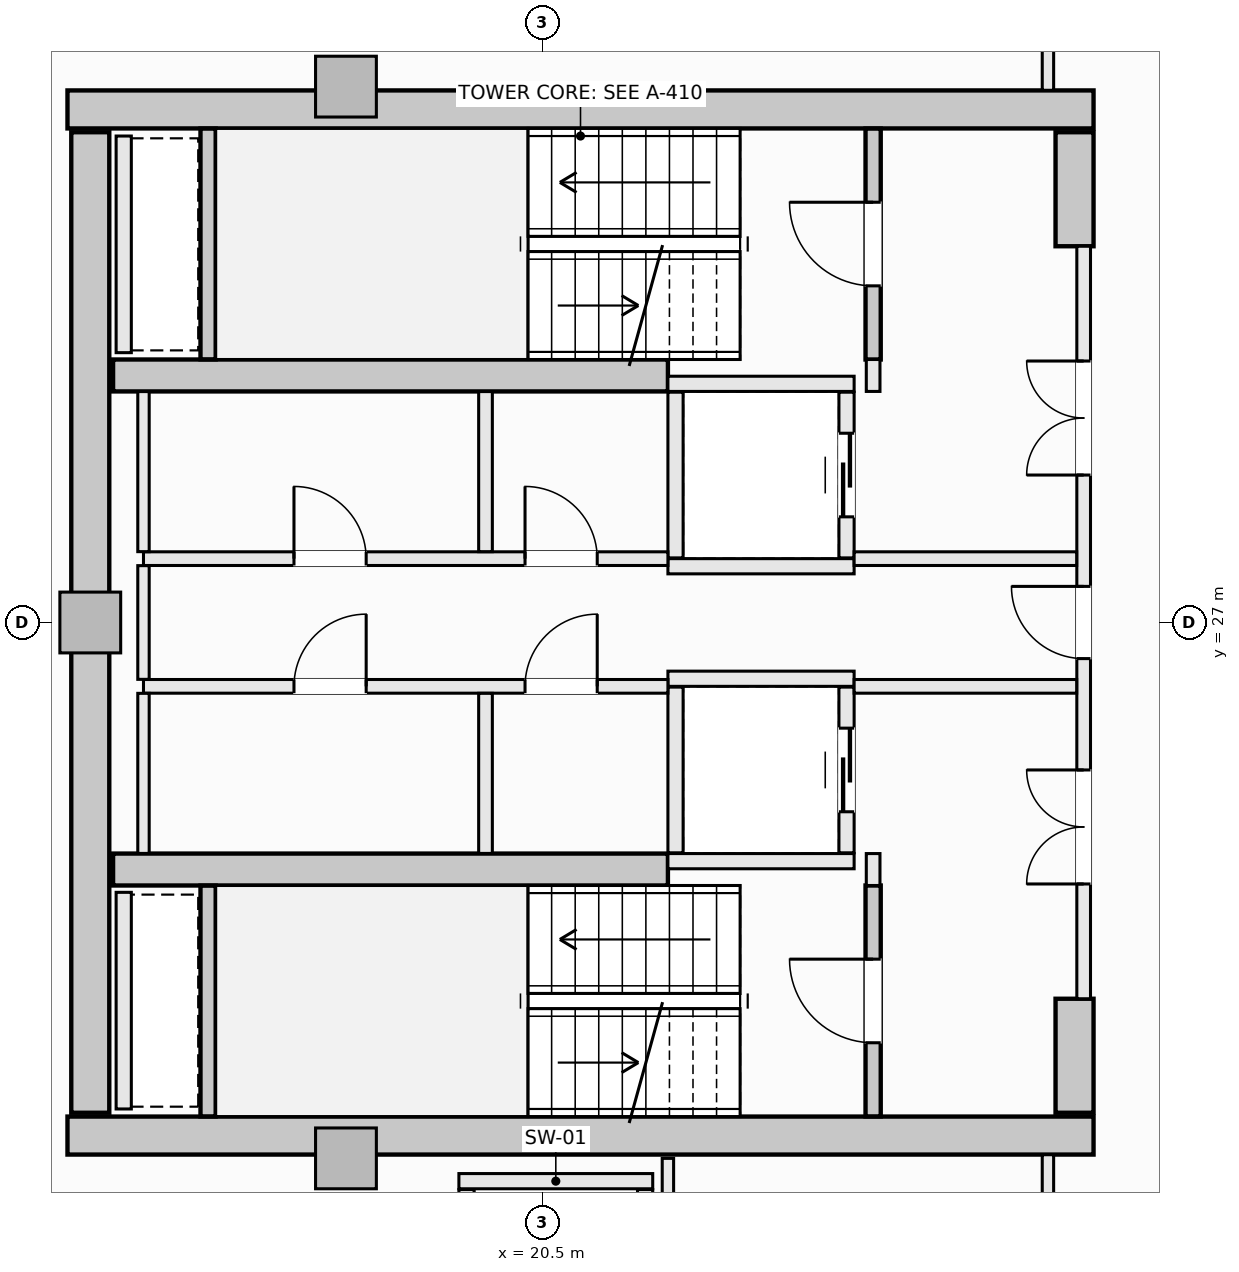
"""IFC4 building model, lengths in metres.
Left out: names, types, materials, properties, quantities, classifications, styles, units other than length and angle.
Written with IfcOpenShell. Run it as: python <this file> out.ifc"""

import sys

from ifc_helpers import new_model, si_unit, direction, frame, frame_2d, origin, origin_2d, place, context, subcontext, project, spatial, rectangle, extrude, element, fill, save


model = new_model("IFC4")
c1 = context("Model", 3, precision=1e-05, world=origin(), true_north=direction((0.0, 1.0)))
c2 = subcontext(c1, "Body", "Model", "MODEL_VIEW")
j1 = project(units=[si_unit("LENGTHUNIT", "METRE"), si_unit("PLANEANGLEUNIT", "RADIAN")], contexts=[c1])
p1 = place(None, origin())
s1 = spatial("IfcSite", under=j1, at=p1, CompositionType="ELEMENT")
p2 = place(p1, origin())
s2 = spatial("IfcBuilding", under=s1, at=p2, CompositionType="ELEMENT")
p3 = place(p2, frame((0.0, 0.0, 239.3)))
s3 = spatial("IfcBuildingStorey", under=s2, at=p3, CompositionType="ELEMENT", Elevation=239.3)
for number, where, z_axis, x_axis in (
    (1, (14.25, 33.75, -0.27), (0.0, 0.0, 1.0), (1.0, 0.0, 0.0)),
    (2, (14.25, 20.25, -0.27), (0.0, 0.0, 1.0), (1.0, 0.0, 0.0)),
):
    element("IfcWall", number, at=place(p3, frame(where, z_axis=z_axis, x_axis=x_axis)), inside=s3, PredefinedType="SHEAR", context=c2, shape_type="SweptSolid", body=[
        extrude(rectangle(XDim=13.5, YDim=0.5, at=frame_2d((6.75, 0.0))), origin(), (0.0, 0.0, 1.0), 3.3),
    ])
p4 = place(p3, frame((14.55, 20.55, -0.27), z_axis=(0.0, 0.0, 1.0), x_axis=(0.0, 1.0, 0.0)))
e3 = element("IfcWall", 3, at=p4, inside=s3, PredefinedType="SHEAR", context=c2, shape_type="SweptSolid", body=[
    extrude(rectangle(XDim=12.9, YDim=0.5, at=frame_2d((6.45, 0.0))), origin(), (0.0, 0.0, 1.0), 3.3),
])
for number, where, z_axis, x_axis in (
    (4, (27.5, 31.95, -0.27), (0.0, 0.0, 1.0), (0.0, 1.0, 0.0)),
    (5, (27.5, 20.55, -0.27), (0.0, 0.0, 1.0), (0.0, 1.0, 0.0)),
):
    element("IfcWall", number, at=place(p3, frame(where, z_axis=z_axis, x_axis=x_axis)), inside=s3, PredefinedType="SHEAR", context=c2, shape_type="SweptSolid", body=[
        extrude(rectangle(XDim=1.5, YDim=0.5, at=frame_2d((0.75, 0.0))), origin(), (0.0, 0.0, 1.0), 3.3),
    ])
for number, where, z_axis, x_axis in (
    (6, (14.85, 30.25, -0.27), (0.0, 0.0, 1.0), (1.0, 0.0, 0.0)),
    (7, (14.85, 23.75, -0.27), (0.0, 0.0, 1.0), (1.0, 0.0, 0.0)),
):
    element("IfcWall", number, at=place(p3, frame(where, z_axis=z_axis, x_axis=x_axis)), inside=s3, PredefinedType="SHEAR", context=c2, shape_type="SweptSolid", body=[
        extrude(rectangle(XDim=7.3, YDim=0.42, at=frame_2d((3.65, 0.0))), origin(), (0.0, 0.0, 1.0), 3.3),
    ])
for number, where, z_axis, x_axis in (
    (8, (17.914, 34.05, -0.27), (0.0, 0.0, 1.0), (1.0, 0.0, 0.0)),
    (9, (14.55, 27.0, -0.27), (0.0, 0.0, 1.0), (1.0, 0.0, 0.0)),
    (10, (17.914, 19.95, -0.27), (0.0, 0.0, 1.0), (1.0, 0.0, 0.0)),
):
    element("IfcColumn", number, at=place(p3, frame(where, z_axis=z_axis, x_axis=x_axis)), inside=s3, PredefinedType="PILASTER", context=c2, shape_type="SweptSolid", body=[
        extrude(rectangle(XDim=0.8, YDim=0.8, at=origin_2d()), origin(), (0.0, 0.0, 1.0), 3.3),
    ])
p5 = place(p3, frame((24.85, 30.46, -0.27), z_axis=(0.0, 0.0, 1.0), x_axis=(0.0, 1.0, 0.0)))
e11 = element("IfcWall", 11, at=p5, inside=s3, PredefinedType="SHEAR", context=c2, shape_type="SweptSolid", body=[
    extrude(rectangle(XDim=3.038, YDim=0.2, at=frame_2d((1.519, 0.0))), origin(), (0.0, 0.0, 1.0), 3.3),
])
p6 = place(p5, frame((0.969, 0.0, 0.27)))
e12 = element("IfcOpeningElement", 12, at=p6, cuts=e11, PredefinedType="OPENING", context=c2, shape_type="SweptSolid", body=[
    extrude(rectangle(XDim=1.1, YDim=2.15, at=frame_2d((0.55, 1.075))), frame((0.0, 0.11, 0.0), z_axis=(0.0, -1.0, 0.0), x_axis=(1.0, 0.0, 0.0)), (0.0, 0.0, 1.0), 0.22),
])
p7 = place(p3, frame((16.1, 30.462, -0.27), z_axis=(0.0, 0.0, 1.0), x_axis=(0.0, 1.0, 0.0)))
e13 = element("IfcWall", 13, at=p7, inside=s3, PredefinedType="SHEAR", context=c2, shape_type="SweptSolid", body=[
    extrude(rectangle(XDim=3.036, YDim=0.2, at=frame_2d((1.518, 0.0))), origin(), (0.0, 0.0, 1.0), 3.3),
])
p8 = place(p3, frame((24.85, 20.502, -0.27), z_axis=(0.0, 0.0, 1.0), x_axis=(0.0, 1.0, 0.0)))
e14 = element("IfcWall", 14, at=p8, inside=s3, PredefinedType="SHEAR", context=c2, shape_type="SweptSolid", body=[
    extrude(rectangle(XDim=3.038, YDim=0.2, at=frame_2d((1.519, 0.0))), origin(), (0.0, 0.0, 1.0), 3.3),
])
p9 = place(p8, frame((0.969, 0.0, 0.27)))
e15 = element("IfcOpeningElement", 15, at=p9, cuts=e14, PredefinedType="OPENING", context=c2, shape_type="SweptSolid", body=[
    extrude(rectangle(XDim=1.1, YDim=2.15, at=frame_2d((0.55, 1.075))), frame((0.0, 0.11, 0.0), z_axis=(0.0, -1.0, 0.0), x_axis=(1.0, 0.0, 0.0)), (0.0, 0.0, 1.0), 0.22),
])
p10 = place(p3, frame((16.1, 20.502, -0.27), z_axis=(0.0, 0.0, 1.0), x_axis=(0.0, 1.0, 0.0)))
e16 = element("IfcWall", 16, at=p10, inside=s3, PredefinedType="SHEAR", context=c2, shape_type="SweptSolid", body=[
    extrude(rectangle(XDim=3.036, YDim=0.2, at=frame_2d((1.518, 0.0))), origin(), (0.0, 0.0, 1.0), 3.3),
])
for number, where, z_axis, x_axis in (
    (17, (22.15, 30.14, 0.0), (0.0, 0.0, 1.0), (1.0, 0.0, 0.0)),
    (18, (22.15, 27.74, 0.0), (0.0, 0.0, 1.0), (1.0, 0.0, 0.0)),
):
    element("IfcWall", number, at=place(p3, frame(where, z_axis=z_axis, x_axis=x_axis)), inside=s3, PredefinedType="SOLIDWALL", context=c2, shape_type="SweptSolid", body=[
        extrude(rectangle(XDim=2.45, YDim=0.2, at=frame_2d((1.225, 0.0))), origin(), (0.0, 0.0, 1.0), 3.03),
    ])
p11 = place(p3, frame((22.25, 27.85, 0.0), z_axis=(0.0, 0.0, 1.0), x_axis=(0.0, 1.0, 0.0)))
e19 = element("IfcWall", 19, at=p11, inside=s3, PredefinedType="SOLIDWALL", context=c2, shape_type="SweptSolid", body=[
    extrude(rectangle(XDim=2.18, YDim=0.2, at=frame_2d((1.09, 0.0))), origin(), (0.0, 0.0, 1.0), 3.03),
])
p12 = place(p3, frame((24.5, 27.85, 0.0), z_axis=(0.0, 0.0, 1.0), x_axis=(0.0, 1.0, 0.0)))
e20 = element("IfcWall", 20, at=p12, inside=s3, PredefinedType="SOLIDWALL", context=c2, shape_type="SweptSolid", body=[
    extrude(rectangle(XDim=2.18, YDim=0.2, at=frame_2d((1.09, 0.0))), origin(), (0.0, 0.0, 1.0), 3.03),
])
p13 = place(p12, frame((0.54, 0.0, 0.0)))
e21 = element("IfcOpeningElement", 21, at=p13, cuts=e20, PredefinedType="OPENING", context=c2, shape_type="SweptSolid", body=[
    extrude(rectangle(XDim=1.1, YDim=2.2, at=frame_2d((0.55, 1.1))), frame((0.0, 0.11, 0.0), z_axis=(0.0, -1.0, 0.0), x_axis=(1.0, 0.0, 0.0)), (0.0, 0.0, 1.0), 0.22),
])
for number, where, z_axis, x_axis in (
    (22, (22.15, 26.26, 0.0), (0.0, 0.0, 1.0), (1.0, 0.0, 0.0)),
    (23, (22.15, 23.86, 0.0), (0.0, 0.0, 1.0), (1.0, 0.0, 0.0)),
):
    element("IfcWall", number, at=place(p3, frame(where, z_axis=z_axis, x_axis=x_axis)), inside=s3, PredefinedType="SOLIDWALL", context=c2, shape_type="SweptSolid", body=[
        extrude(rectangle(XDim=2.45, YDim=0.2, at=frame_2d((1.225, 0.0))), origin(), (0.0, 0.0, 1.0), 3.03),
    ])
p14 = place(p3, frame((22.25, 23.97, 0.0), z_axis=(0.0, 0.0, 1.0), x_axis=(0.0, 1.0, 0.0)))
e24 = element("IfcWall", 24, at=p14, inside=s3, PredefinedType="SOLIDWALL", context=c2, shape_type="SweptSolid", body=[
    extrude(rectangle(XDim=2.18, YDim=0.2, at=frame_2d((1.09, 0.0))), origin(), (0.0, 0.0, 1.0), 3.03),
])
p15 = place(p3, frame((24.5, 23.97, 0.0), z_axis=(0.0, 0.0, 1.0), x_axis=(0.0, 1.0, 0.0)))
e25 = element("IfcWall", 25, at=p15, inside=s3, PredefinedType="SOLIDWALL", context=c2, shape_type="SweptSolid", body=[
    extrude(rectangle(XDim=2.18, YDim=0.2, at=frame_2d((1.09, 0.0))), origin(), (0.0, 0.0, 1.0), 3.03),
])
p16 = place(p15, frame((0.54, 0.0, 0.0)))
e26 = element("IfcOpeningElement", 26, at=p16, cuts=e25, PredefinedType="OPENING", context=c2, shape_type="SweptSolid", body=[
    extrude(rectangle(XDim=1.1, YDim=2.2, at=frame_2d((0.55, 1.1))), frame((0.0, 0.11, 0.0), z_axis=(0.0, -1.0, 0.0), x_axis=(1.0, 0.0, 0.0)), (0.0, 0.0, 1.0), 0.22),
])
p17 = place(p3, frame((19.4, 19.65, 0.0), z_axis=(0.0, 0.0, 1.0), x_axis=(1.0, 0.0, 0.0)))
e27 = element("IfcWall", 27, at=p17, inside=s3, PredefinedType="SOLIDWALL", context=c2, shape_type="SweptSolid", body=[
    extrude(rectangle(XDim=2.55, YDim=0.2, at=frame_2d((1.275, 0.0))), origin(), (0.0, 0.0, 1.0), 3.03),
])
for number, where, z_axis, x_axis in (
    (28, (19.5, 17.01, 0.0), (0.0, 0.0, 1.0), (0.0, 1.0, 0.0)),
    (29, (21.85, 17.01, 0.0), (0.0, 0.0, 1.0), (0.0, 1.0, 0.0)),
):
    element("IfcWall", number, at=place(p3, frame(where, z_axis=z_axis, x_axis=x_axis)), inside=s3, PredefinedType="SOLIDWALL", context=c2, shape_type="SweptSolid", body=[
        extrude(rectangle(XDim=2.53, YDim=0.2, at=frame_2d((1.265, 0.0))), origin(), (0.0, 0.0, 1.0), 3.03),
    ])
for number, where, z_axis, x_axis in (
    (30, (14.99, 30.55, 0.0), (0.0, 0.0, 1.0), (0.0, 1.0, 0.0)),
    (31, (14.99, 20.6, 0.0), (0.0, 0.0, 1.0), (0.0, 1.0, 0.0)),
):
    element("IfcWall", number, at=place(p3, frame(where, z_axis=z_axis, x_axis=x_axis)), inside=s3, PredefinedType="SOLIDWALL", context=c2, shape_type="SweptSolid", body=[
        extrude(rectangle(XDim=2.85, YDim=0.2, at=frame_2d((1.425, 0.0))), origin(), (0.0, 0.0, 1.0), 3.03),
    ])
for number, where, z_axis, x_axis in (
    (32, (24.85, 23.54, 0.0), (0.0, 0.0, 1.0), (0.0, 1.0, 0.0)),
    (33, (24.85, 30.04, 0.0), (0.0, 0.0, 1.0), (0.0, 1.0, 0.0)),
):
    element("IfcWall", number, at=place(p3, frame(where, z_axis=z_axis, x_axis=x_axis)), inside=s3, PredefinedType="SOLIDWALL", context=c2, shape_type="SweptSolid", body=[
        extrude(rectangle(XDim=0.42, YDim=0.18, at=frame_2d((0.21, 0.0))), origin(), (0.0, 0.0, 1.0), 3.03),
    ])
p18 = place(p3, frame((27.62, 22.05, 0.0), z_axis=(0.0, 0.0, 1.0), x_axis=(0.0, 1.0, 0.0)))
e34 = element("IfcWall", 34, at=p18, inside=s3, PredefinedType="SOLIDWALL", context=c2, shape_type="SweptSolid", body=[
    extrude(rectangle(XDim=9.9, YDim=0.18, at=frame_2d((4.95, 0.0))), origin(), (0.0, 0.0, 1.0), 3.03),
])
p19 = place(p18, frame((4.475, 0.0, 0.0)))
e35 = element("IfcOpeningElement", 35, at=p19, cuts=e34, PredefinedType="OPENING", context=c2, shape_type="SweptSolid", body=[
    extrude(rectangle(XDim=0.95, YDim=2.1, at=frame_2d((0.475, 1.05))), frame((0.0, 0.1, 0.0), z_axis=(0.0, -1.0, 0.0), x_axis=(1.0, 0.0, 0.0)), (0.0, 0.0, 1.0), 0.2),
])
p20 = place(p18, frame((6.89, 0.0, 0.0)))
e36 = element("IfcOpeningElement", 36, at=p20, cuts=e34, PredefinedType="OPENING", context=c2, shape_type="SweptSolid", body=[
    extrude(rectangle(XDim=1.5, YDim=2.2, at=frame_2d((0.75, 1.1))), frame((0.0, 0.1, 0.0), z_axis=(0.0, -1.0, 0.0), x_axis=(1.0, 0.0, 0.0)), (0.0, 0.0, 1.0), 0.2),
])
p21 = place(p18, frame((1.51, 0.0, 0.0)))
e37 = element("IfcOpeningElement", 37, at=p21, cuts=e34, PredefinedType="OPENING", context=c2, shape_type="SweptSolid", body=[
    extrude(rectangle(XDim=1.5, YDim=2.2, at=frame_2d((0.75, 1.1))), frame((0.0, 0.1, 0.0), z_axis=(0.0, -1.0, 0.0), x_axis=(1.0, 0.0, 0.0)), (0.0, 0.0, 1.0), 0.2),
])
p22 = place(p3, frame((15.25, 27.84, 0.0), z_axis=(0.0, 0.0, 1.0), x_axis=(1.0, 0.0, 0.0)))
e38 = element("IfcWall", 38, at=p22, inside=s3, PredefinedType="SOLIDWALL", context=c2, shape_type="SweptSolid", body=[
    extrude(rectangle(XDim=6.9, YDim=0.18, at=frame_2d((3.45, 0.0))), origin(), (0.0, 0.0, 1.0), 3.03),
])
p23 = place(p22, frame((5.02, 0.0, 0.0)))
e39 = element("IfcOpeningElement", 39, at=p23, cuts=e38, PredefinedType="OPENING", context=c2, shape_type="SweptSolid", body=[
    extrude(rectangle(XDim=0.95, YDim=2.1, at=frame_2d((0.475, 1.05))), frame((0.0, 0.1, 0.0), z_axis=(0.0, -1.0, 0.0), x_axis=(1.0, 0.0, 0.0)), (0.0, 0.0, 1.0), 0.2),
])
p24 = place(p22, frame((1.98, 0.0, 0.0)))
e40 = element("IfcOpeningElement", 40, at=p24, cuts=e38, PredefinedType="OPENING", context=c2, shape_type="SweptSolid", body=[
    extrude(rectangle(XDim=0.95, YDim=2.1, at=frame_2d((0.475, 1.05))), frame((0.0, 0.1, 0.0), z_axis=(0.0, -1.0, 0.0), x_axis=(1.0, 0.0, 0.0)), (0.0, 0.0, 1.0), 0.2),
])
p25 = place(p3, frame((24.6, 27.84, 0.0), z_axis=(0.0, 0.0, 1.0), x_axis=(1.0, 0.0, 0.0)))
e41 = element("IfcWall", 41, at=p25, inside=s3, PredefinedType="SOLIDWALL", context=c2, shape_type="SweptSolid", body=[
    extrude(rectangle(XDim=2.928, YDim=0.18, at=frame_2d((1.464, 0.0))), origin(), (0.0, 0.0, 1.0), 3.03),
])
p26 = place(p3, frame((15.25, 26.16, 0.0), z_axis=(0.0, 0.0, 1.0), x_axis=(1.0, 0.0, 0.0)))
e42 = element("IfcWall", 42, at=p26, inside=s3, PredefinedType="SOLIDWALL", context=c2, shape_type="SweptSolid", body=[
    extrude(rectangle(XDim=6.9, YDim=0.18, at=frame_2d((3.45, 0.0))), origin(), (0.0, 0.0, 1.0), 3.03),
])
p27 = place(p26, frame((5.02, 0.0, 0.0)))
e43 = element("IfcOpeningElement", 43, at=p27, cuts=e42, PredefinedType="OPENING", context=c2, shape_type="SweptSolid", body=[
    extrude(rectangle(XDim=0.95, YDim=2.1, at=frame_2d((0.475, 1.05))), frame((0.0, 0.1, 0.0), z_axis=(0.0, -1.0, 0.0), x_axis=(1.0, 0.0, 0.0)), (0.0, 0.0, 1.0), 0.2),
])
p28 = place(p26, frame((1.98, 0.0, 0.0)))
e44 = element("IfcOpeningElement", 44, at=p28, cuts=e42, PredefinedType="OPENING", context=c2, shape_type="SweptSolid", body=[
    extrude(rectangle(XDim=0.95, YDim=2.1, at=frame_2d((0.475, 1.05))), frame((0.0, 0.1, 0.0), z_axis=(0.0, -1.0, 0.0), x_axis=(1.0, 0.0, 0.0)), (0.0, 0.0, 1.0), 0.2),
])
p29 = place(p3, frame((24.6, 26.16, 0.0), z_axis=(0.0, 0.0, 1.0), x_axis=(1.0, 0.0, 0.0)))
e45 = element("IfcWall", 45, at=p29, inside=s3, PredefinedType="SOLIDWALL", context=c2, shape_type="SweptSolid", body=[
    extrude(rectangle(XDim=2.928, YDim=0.18, at=frame_2d((1.464, 0.0))), origin(), (0.0, 0.0, 1.0), 3.03),
])
p30 = place(p3, frame((15.25, 23.962, 0.0), z_axis=(0.0, 0.0, 1.0), x_axis=(0.0, 1.0, 0.0)))
e46 = element("IfcWall", 46, at=p30, inside=s3, PredefinedType="PARTITIONING", context=c2, shape_type="SweptSolid", body=[
    extrude(rectangle(XDim=2.106, YDim=0.15, at=frame_2d((1.053, 0.0))), origin(), (0.0, 0.0, 1.0), 3.03),
])
p31 = place(p3, frame((15.25, 26.252, 0.0), z_axis=(0.0, 0.0, 1.0), x_axis=(0.0, 1.0, 0.0)))
e47 = element("IfcWall", 47, at=p31, inside=s3, PredefinedType="PARTITIONING", context=c2, shape_type="SweptSolid", body=[
    extrude(rectangle(XDim=1.496, YDim=0.15, at=frame_2d((0.748, 0.0))), origin(), (0.0, 0.0, 1.0), 3.03),
])
p32 = place(p3, frame((15.25, 27.932, 0.0), z_axis=(0.0, 0.0, 1.0), x_axis=(0.0, 1.0, 0.0)))
e48 = element("IfcWall", 48, at=p32, inside=s3, PredefinedType="PARTITIONING", context=c2, shape_type="SweptSolid", body=[
    extrude(rectangle(XDim=2.106, YDim=0.15, at=frame_2d((1.053, 0.0))), origin(), (0.0, 0.0, 1.0), 3.03),
])
for number, where, z_axis, x_axis in (
    (49, (19.75, 23.962, 0.0), (0.0, 0.0, 1.0), (0.0, 1.0, 0.0)),
    (50, (19.75, 27.932, 0.0), (0.0, 0.0, 1.0), (0.0, 1.0, 0.0)),
):
    element("IfcWall", number, at=place(p3, frame(where, z_axis=z_axis, x_axis=x_axis)), inside=s3, PredefinedType="SOLIDWALL", context=c2, shape_type="SweptSolid", body=[
        extrude(rectangle(XDim=2.106, YDim=0.18, at=frame_2d((1.053, 0.0))), origin(), (0.0, 0.0, 1.0), 3.03),
    ])
p33 = place(p3, frame((22.15, 17.127, 0.0), z_axis=(0.0, 0.0, 1.0), x_axis=(0.0, 1.0, 0.0)))
e51 = element("IfcWall", 51, at=p33, inside=s3, PredefinedType="PARTITIONING", context=c2, shape_type="SweptSolid", body=[
    extrude(rectangle(XDim=2.823, YDim=0.15, at=frame_2d((1.412, 0.0))), origin(), (0.0, 0.0, 1.0), 3.03),
])
p34 = place(p3, frame((27.15, 17.127, 0.0), z_axis=(0.0, 0.0, 1.0), x_axis=(0.0, 1.0, 0.0)))
e52 = element("IfcWall", 52, at=p34, inside=s3, PredefinedType="PARTITIONING", context=c2, shape_type="SweptSolid", body=[
    extrude(rectangle(XDim=2.871, YDim=0.15, at=frame_2d((1.436, 0.0))), origin(), (0.0, 0.0, 1.0), 3.03),
])
p35 = place(p34, frame((0.96, 0.0, 0.0)))
e53 = element("IfcOpeningElement", 53, at=p35, cuts=e52, PredefinedType="OPENING", context=c2, shape_type="SweptSolid", body=[
    extrude(rectangle(XDim=0.95, YDim=2.1, at=frame_2d((0.475, 1.05))), frame((0.0, 0.085, 0.0), z_axis=(0.0, -1.0, 0.0), x_axis=(1.0, 0.0, 0.0)), (0.0, 0.0, 1.0), 0.17),
])
p36 = place(p3, frame((27.15, 34.002, 0.0), z_axis=(0.0, 0.0, 1.0), x_axis=(0.0, 1.0, 0.0)))
e54 = element("IfcWall", 54, at=p36, inside=s3, PredefinedType="PARTITIONING", context=c2, shape_type="SweptSolid", body=[
    extrude(rectangle(XDim=4.198, YDim=0.15, at=frame_2d((2.099, 0.0))), origin(), (0.0, 0.0, 1.0), 3.03),
])
p37 = place(p36, frame((1.998, 0.0, 0.0)))
e55 = element("IfcOpeningElement", 55, at=p37, cuts=e54, PredefinedType="OPENING", context=c2, shape_type="SweptSolid", body=[
    extrude(rectangle(XDim=0.95, YDim=2.1, at=frame_2d((0.475, 1.05))), frame((0.0, 0.085, 0.0), z_axis=(0.0, -1.0, 0.0), x_axis=(1.0, 0.0, 0.0)), (0.0, 0.0, 1.0), 0.17),
])
p38 = place(p6, origin())
e56 = element("IfcDoor", 56, at=p38, inside=s3, OperationType="SINGLE_SWING_RIGHT", PredefinedType="DOOR", context=c2, shape_type="SweptSolid", body=[
    extrude(rectangle(XDim=1.1, YDim=2.15, at=frame_2d((0.55, 1.075))), frame((0.0, 0.025, 0.0), z_axis=(0.0, -1.0, 0.0), x_axis=(1.0, 0.0, 0.0)), (0.0, 0.0, 1.0), 0.05),
])
fill(e12, e56)
p39 = place(p9, origin())
e57 = element("IfcDoor", 57, at=p39, inside=s3, OperationType="SINGLE_SWING_RIGHT", PredefinedType="DOOR", context=c2, shape_type="SweptSolid", body=[
    extrude(rectangle(XDim=1.1, YDim=2.15, at=frame_2d((0.55, 1.075))), frame((0.0, 0.025, 0.0), z_axis=(0.0, -1.0, 0.0), x_axis=(1.0, 0.0, 0.0)), (0.0, 0.0, 1.0), 0.05),
])
fill(e15, e57)
p40 = place(p13, origin())
e58 = element("IfcDoor", 58, at=p40, inside=s3, OperationType="SLIDING_TO_LEFT", PredefinedType="DOOR", context=c2, shape_type="SweptSolid", body=[
    extrude(rectangle(XDim=1.1, YDim=2.2, at=frame_2d((0.55, 1.1))), frame((0.0, 0.025, 0.0), z_axis=(0.0, -1.0, 0.0), x_axis=(1.0, 0.0, 0.0)), (0.0, 0.0, 1.0), 0.05),
])
fill(e21, e58)
p41 = place(p16, origin())
e59 = element("IfcDoor", 59, at=p41, inside=s3, OperationType="SLIDING_TO_LEFT", PredefinedType="DOOR", context=c2, shape_type="SweptSolid", body=[
    extrude(rectangle(XDim=1.1, YDim=2.2, at=frame_2d((0.55, 1.1))), frame((0.0, 0.025, 0.0), z_axis=(0.0, -1.0, 0.0), x_axis=(1.0, 0.0, 0.0)), (0.0, 0.0, 1.0), 0.05),
])
fill(e26, e59)
p42 = place(p19, origin())
e60 = element("IfcDoor", 60, at=p42, inside=s3, OperationType="SINGLE_SWING_RIGHT", PredefinedType="DOOR", context=c2, shape_type="SweptSolid", body=[
    extrude(rectangle(XDim=0.95, YDim=2.1, at=frame_2d((0.475, 1.05))), frame((0.0, 0.025, 0.0), z_axis=(0.0, -1.0, 0.0), x_axis=(1.0, 0.0, 0.0)), (0.0, 0.0, 1.0), 0.05),
])
fill(e35, e60)
p43 = place(p20, origin())
e61 = element("IfcDoor", 61, at=p43, inside=s3, OperationType="DOUBLE_DOOR_SINGLE_SWING", PredefinedType="DOOR", context=c2, shape_type="SweptSolid", body=[
    extrude(rectangle(XDim=1.5, YDim=2.2, at=frame_2d((0.75, 1.1))), frame((0.0, 0.025, 0.0), z_axis=(0.0, -1.0, 0.0), x_axis=(1.0, 0.0, 0.0)), (0.0, 0.0, 1.0), 0.05),
])
fill(e36, e61)
p44 = place(p21, origin())
e62 = element("IfcDoor", 62, at=p44, inside=s3, OperationType="DOUBLE_DOOR_SINGLE_SWING", PredefinedType="DOOR", context=c2, shape_type="SweptSolid", body=[
    extrude(rectangle(XDim=1.5, YDim=2.2, at=frame_2d((0.75, 1.1))), frame((0.0, 0.025, 0.0), z_axis=(0.0, -1.0, 0.0), x_axis=(1.0, 0.0, 0.0)), (0.0, 0.0, 1.0), 0.05),
])
fill(e37, e62)
p45 = place(p23, origin())
e63 = element("IfcDoor", 63, at=p45, inside=s3, OperationType="SINGLE_SWING_LEFT", PredefinedType="DOOR", context=c2, shape_type="SweptSolid", body=[
    extrude(rectangle(XDim=0.95, YDim=2.1, at=frame_2d((0.475, 1.05))), frame((0.0, 0.025, 0.0), z_axis=(0.0, -1.0, 0.0), x_axis=(1.0, 0.0, 0.0)), (0.0, 0.0, 1.0), 0.05),
])
fill(e39, e63)
p46 = place(p27, origin())
e64 = element("IfcDoor", 64, at=p46, inside=s3, OperationType="SINGLE_SWING_RIGHT", PredefinedType="DOOR", context=c2, shape_type="SweptSolid", body=[
    extrude(rectangle(XDim=0.95, YDim=2.1, at=frame_2d((0.475, 1.05))), frame((0.0, 0.025, 0.0), z_axis=(0.0, -1.0, 0.0), x_axis=(1.0, 0.0, 0.0)), (0.0, 0.0, 1.0), 0.05),
])
fill(e43, e64)
p47 = place(p24, origin())
e65 = element("IfcDoor", 65, at=p47, inside=s3, OperationType="SINGLE_SWING_LEFT", PredefinedType="DOOR", context=c2, shape_type="SweptSolid", body=[
    extrude(rectangle(XDim=0.95, YDim=2.1, at=frame_2d((0.475, 1.05))), frame((0.0, 0.025, 0.0), z_axis=(0.0, -1.0, 0.0), x_axis=(1.0, 0.0, 0.0)), (0.0, 0.0, 1.0), 0.05),
])
fill(e40, e65)
p48 = place(p28, origin())
e66 = element("IfcDoor", 66, at=p48, inside=s3, OperationType="SINGLE_SWING_RIGHT", PredefinedType="DOOR", context=c2, shape_type="SweptSolid", body=[
    extrude(rectangle(XDim=0.95, YDim=2.1, at=frame_2d((0.475, 1.05))), frame((0.0, 0.025, 0.0), z_axis=(0.0, -1.0, 0.0), x_axis=(1.0, 0.0, 0.0)), (0.0, 0.0, 1.0), 0.05),
])
fill(e44, e66)
save(model, sys.argv[1])
